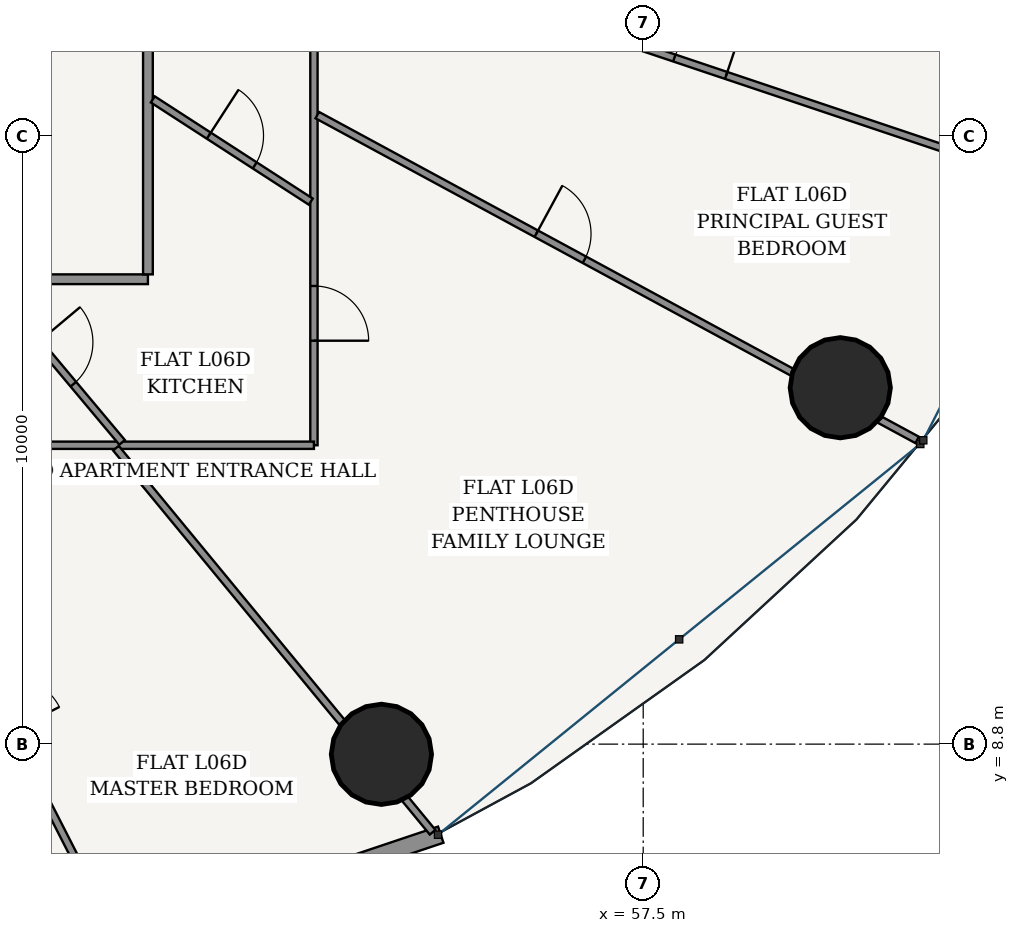
"""IFC4 building model, lengths in metres.
Left out: names, types, materials, properties, quantities, classifications, styles, units other than length and angle.
Written with IfcOpenShell. Run it as: python <this file> out.ifc"""

import sys

from ifc_helpers import new_model, si_unit, direction, frame, frame_2d, origin, origin_2d, place, context, subcontext, project, spatial, rectangle, hollow_circle, extrude, source, transform, mapped, element, fill, save


model = new_model("IFC4")
c1 = context("Model", 3, precision=1e-05, world=origin(), true_north=direction((-0.2419218956, 0.970295726276)))
c2 = subcontext(c1, "Body", "Model", "MODEL_VIEW")
j1 = project(units=[si_unit("LENGTHUNIT", "METRE"), si_unit("PLANEANGLEUNIT", "RADIAN")], contexts=[c1])
p1 = place(None, origin())
s1 = spatial("IfcSite", under=j1, at=p1, CompositionType="ELEMENT")
p2 = place(p1, origin())
s2 = spatial("IfcBuilding", under=s1, at=p2, CompositionType="ELEMENT")
p3 = place(p2, frame((0.0, 0.0, 27.6)))
s3 = spatial("IfcBuildingStorey", under=s2, at=p3, CompositionType="ELEMENT", Elevation=27.6)
for number, where, z_axis, x_axis in (
    (1, (53.195, 8.632, 0.0), (0.0, 0.0, 1.0), (1.0, 0.0, 0.0)),
    (2, (60.741, 14.661, 0.0), (0.0, 0.0, 1.0), (1.0, 0.0, 0.0)),
):
    element("IfcColumn", number, at=place(p3, frame(where, z_axis=z_axis, x_axis=x_axis)), inside=s3, PredefinedType="COLUMN", context=c2, shape_type="SweptSolid", body=[
        extrude(hollow_circle(Radius=0.825, WallThickness=0.05, at=origin_2d()), origin(), (0.0, 0.0, 1.0), 3.6),
    ])
p4 = place(p3, frame((43.576, 3.756, 0.0), z_axis=(0.0, 0.0, 1.0), x_axis=(0.948047847546, 0.31812777113, 0.0)))
e3 = element("IfcWall", 3, at=p4, inside=s3, PredefinedType="SOLIDWALL", context=c2, shape_type="SweptSolid", body=[
    extrude(rectangle(XDim=11.175, YDim=0.28, at=frame_2d((5.588, 0.0))), origin(), (0.0, 0.0, 1.0), 3.32),
])
p5 = place(p4, frame((1.967, 0.0, 0.85)))
e4 = element("IfcOpeningElement", 4, at=p5, cuts=e3, PredefinedType="OPENING", context=c2, shape_type="SweptSolid", body=[
    extrude(rectangle(XDim=2.1, YDim=1.95, at=frame_2d((1.05, 0.975))), frame((0.0, 0.15, 0.0), z_axis=(0.0, -1.0, 0.0), x_axis=(1.0, 0.0, 0.0)), (0.0, 0.0, 1.0), 0.3),
])
p6 = place(p4, frame((7.108, 0.0, 0.85)))
e5 = element("IfcOpeningElement", 5, at=p6, cuts=e3, PredefinedType="OPENING", context=c2, shape_type="SweptSolid", body=[
    extrude(rectangle(XDim=2.1, YDim=1.95, at=frame_2d((1.05, 0.975))), frame((0.0, 0.15, 0.0), z_axis=(0.0, -1.0, 0.0), x_axis=(1.0, 0.0, 0.0)), (0.0, 0.0, 1.0), 0.3),
])
p7 = place(p3, frame((26.645, 16.445, 0.0), z_axis=(0.0, 0.0, 1.0), x_axis=(1.0, 0.0, 0.0)))
e6 = element("IfcWall", 6, at=p7, inside=s3, PredefinedType="PARTITIONING", context=c2, shape_type="SweptSolid", body=[
    extrude(rectangle(XDim=22.71, YDim=0.16, at=frame_2d((11.355, 0.0))), origin(), (0.0, 0.0, 1.0), 2.688),
])
p8 = place(p7, frame((4.421, 0.0, 0.0)))
e7 = element("IfcOpeningElement", 7, at=p8, cuts=e6, PredefinedType="OPENING", context=c2, shape_type="SweptSolid", body=[
    extrude(rectangle(XDim=0.98, YDim=2.2, at=frame_2d((0.49, 1.1))), frame((0.0, 0.09, 0.0), z_axis=(0.0, -1.0, 0.0), x_axis=(1.0, 0.0, 0.0)), (0.0, 0.0, 1.0), 0.18),
])
p9 = place(p7, frame((16.153, 0.0, 0.0)))
e8 = element("IfcOpeningElement", 8, at=p9, cuts=e6, PredefinedType="OPENING", context=c2, shape_type="SweptSolid", body=[
    extrude(rectangle(XDim=0.98, YDim=2.2, at=frame_2d((0.49, 1.1))), frame((0.0, 0.09, 0.0), z_axis=(0.0, -1.0, 0.0), x_axis=(1.0, 0.0, 0.0)), (0.0, 0.0, 1.0), 0.18),
])
p10 = place(p3, frame((49.355, 16.525, 0.0), z_axis=(0.0, 0.0, 1.0), x_axis=(0.0, 1.0, 0.0)))
e9 = element("IfcWall", 9, at=p10, inside=s3, PredefinedType="PARTITIONING", context=c2, shape_type="SweptSolid", body=[
    extrude(rectangle(XDim=20.55, YDim=0.16, at=frame_2d((10.275, 0.0))), origin(), (0.0, 0.0, 1.0), 2.688),
])
p11 = place(p10, frame((15.635, 0.0, 0.0)))
e10 = element("IfcOpeningElement", 10, at=p11, cuts=e9, PredefinedType="OPENING", context=c2, shape_type="SweptSolid", body=[
    extrude(rectangle(XDim=0.98, YDim=2.2, at=frame_2d((0.49, 1.1))), frame((0.0, 0.09, 0.0), z_axis=(0.0, -1.0, 0.0), x_axis=(1.0, 0.0, 0.0)), (0.0, 0.0, 1.0), 0.18),
])
p12 = place(p3, frame((52.085, 24.428, 0.0), z_axis=(0.0, 0.0, 1.0), x_axis=(0.0, -1.0, 0.0)))
e11 = element("IfcWall", 11, at=p12, inside=s3, PredefinedType="PARTITIONING", context=c2, shape_type="SweptSolid", body=[
    extrude(rectangle(XDim=10.713, YDim=0.12, at=frame_2d((5.356, 0.0))), origin(), (0.0, 0.0, 1.0), 2.688),
])
p13 = place(p12, frame((8.094, 0.0, 0.0)))
e12 = element("IfcOpeningElement", 12, at=p13, cuts=e11, PredefinedType="OPENING", context=c2, shape_type="SweptSolid", body=[
    extrude(rectangle(XDim=0.9, YDim=2.15, at=frame_2d((0.45, 1.075))), frame((0.0, 0.07, 0.0), z_axis=(0.0, -1.0, 0.0), x_axis=(1.0, 0.0, 0.0)), (0.0, 0.0, 1.0), 0.14),
])
p14 = place(p3, frame((52.085, 13.715, 0.0), z_axis=(0.0, 0.0, 1.0), x_axis=(-1.0, 0.0, 0.0)))
e13 = element("IfcWall", 13, at=p14, inside=s3, PredefinedType="PARTITIONING", context=c2, shape_type="SweptSolid", body=[
    extrude(rectangle(XDim=17.195, YDim=0.12, at=frame_2d((8.597, 0.0))), origin(), (0.0, 0.0, 1.0), 2.688),
])
p15 = place(p14, frame((9.191, 0.0, 0.0)))
e14 = element("IfcOpeningElement", 14, at=p15, cuts=e13, PredefinedType="OPENING", context=c2, shape_type="SweptSolid", body=[
    extrude(rectangle(XDim=0.9, YDim=2.15, at=frame_2d((0.45, 1.075))), frame((0.0, 0.07, 0.0), z_axis=(0.0, -1.0, 0.0), x_axis=(1.0, 0.0, 0.0)), (0.0, 0.0, 1.0), 0.14),
])
p16 = place(p3, frame((44.717, 13.66, 0.0), z_axis=(0.0, 0.0, 1.0), x_axis=(0.455131303234, -0.890424335256, 0.0)))
e15 = element("IfcWall", 15, at=p16, inside=s3, PredefinedType="PARTITIONING", context=c2, shape_type="SweptSolid", body=[
    extrude(rectangle(XDim=9.562, YDim=0.12, at=frame_2d((4.781, 0.0))), origin(), (0.0, 0.0, 1.0), 2.762),
])
p17 = place(p16, frame((4.331, 0.0, 0.0)))
e16 = element("IfcOpeningElement", 16, at=p17, cuts=e15, PredefinedType="OPENING", context=c2, shape_type="SweptSolid", body=[
    extrude(rectangle(XDim=0.9, YDim=2.15, at=frame_2d((0.45, 1.075))), frame((0.0, 0.07, 0.0), z_axis=(0.0, -1.0, 0.0), x_axis=(1.0, 0.0, 0.0)), (0.0, 0.0, 1.0), 0.14),
])
p18 = place(p3, frame((48.829, 13.667, 0.0), z_axis=(0.0, 0.0, 1.0), x_axis=(0.636177533893, -0.771542704826, 0.0)))
e17 = element("IfcWall", 17, at=p18, inside=s3, PredefinedType="PARTITIONING", context=c2, shape_type="SweptSolid", body=[
    extrude(rectangle(XDim=8.187, YDim=0.12, at=frame_2d((4.093, 0.0))), origin(), (0.0, 0.0, 1.0), 2.688),
])
p19 = place(p3, frame((52.139, 19.144, 0.0), z_axis=(0.0, 0.0, 1.0), x_axis=(0.879372452045, -0.476134529922, 0.0)))
e18 = element("IfcWall", 18, at=p19, inside=s3, PredefinedType="PARTITIONING", context=c2, shape_type="SweptSolid", body=[
    extrude(rectangle(XDim=11.219, YDim=0.12, at=frame_2d((5.61, 0.0))), origin(), (0.0, 0.0, 1.0), 2.688),
])
p20 = place(p19, frame((4.097, 0.0, 0.0)))
e19 = element("IfcOpeningElement", 19, at=p20, cuts=e18, PredefinedType="OPENING", context=c2, shape_type="SweptSolid", body=[
    extrude(rectangle(XDim=0.9, YDim=2.15, at=frame_2d((0.45, 1.075))), frame((0.0, 0.07, 0.0), z_axis=(0.0, -1.0, 0.0), x_axis=(1.0, 0.0, 0.0)), (0.0, 0.0, 1.0), 0.14),
])
p21 = place(p3, frame((52.144, 22.052, 0.0), z_axis=(0.0, 0.0, 1.0), x_axis=(0.948023034133, -0.318201707653, 0.0)))
e20 = element("IfcWall", 20, at=p21, inside=s3, PredefinedType="PARTITIONING", context=c2, shape_type="SweptSolid", body=[
    extrude(rectangle(XDim=13.279, YDim=0.12, at=frame_2d((6.639, 0.0))), origin(), (0.0, 0.0, 1.0), 2.762),
])
p22 = place(p21, frame((6.189, 0.0, 0.0)))
e21 = element("IfcOpeningElement", 21, at=p22, cuts=e20, PredefinedType="OPENING", context=c2, shape_type="SweptSolid", body=[
    extrude(rectangle(XDim=0.9, YDim=2.15, at=frame_2d((0.45, 1.075))), frame((0.0, 0.07, 0.0), z_axis=(0.0, -1.0, 0.0), x_axis=(1.0, 0.0, 0.0)), (0.0, 0.0, 1.0), 0.14),
])
p23 = place(p3, frame((46.749, 16.365, 0.0), z_axis=(0.0, 0.0, 1.0), x_axis=(0.64245841772, -0.766320547487, 0.0)))
e22 = element("IfcWall", 22, at=p23, inside=s3, PredefinedType="PARTITIONING", context=c2, shape_type="SweptSolid", body=[
    extrude(rectangle(XDim=3.396, YDim=0.12, at=frame_2d((1.698, 0.0))), origin(), (0.0, 0.0, 1.0), 3.32),
])
p24 = place(p23, frame((1.248, 0.0, 0.0)))
e23 = element("IfcOpeningElement", 23, at=p24, cuts=e22, PredefinedType="OPENING", context=c2, shape_type="SweptSolid", body=[
    extrude(rectangle(XDim=0.9, YDim=2.15, at=frame_2d((0.45, 1.075))), frame((0.0, 0.07, 0.0), z_axis=(0.0, -1.0, 0.0), x_axis=(1.0, 0.0, 0.0)), (0.0, 0.0, 1.0), 0.14),
])
p25 = place(p3, frame((49.435, 19.402, 0.0), z_axis=(0.0, 0.0, 1.0), x_axis=(0.839582858019, -0.543231649042, 0.0)))
e24 = element("IfcWall", 24, at=p25, inside=s3, PredefinedType="PARTITIONING", context=c2, shape_type="SweptSolid", body=[
    extrude(rectangle(XDim=3.094, YDim=0.12, at=frame_2d((1.547, 0.0))), origin(), (0.0, 0.0, 1.0), 3.32),
])
p26 = place(p25, frame((1.097, 0.0, 0.0)))
e25 = element("IfcOpeningElement", 25, at=p26, cuts=e24, PredefinedType="OPENING", context=c2, shape_type="SweptSolid", body=[
    extrude(rectangle(XDim=0.9, YDim=2.15, at=frame_2d((0.45, 1.075))), frame((0.0, 0.07, 0.0), z_axis=(0.0, -1.0, 0.0), x_axis=(1.0, 0.0, 0.0)), (0.0, 0.0, 1.0), 0.14),
])
m1 = source(origin(), c2, "Body", "SweptSolid", [
    extrude(rectangle(XDim=0.9, YDim=2.15, at=frame_2d((0.45, 1.075))), frame((0.0, 0.025, 0.0), z_axis=(0.0, -1.0, 0.0), x_axis=(1.0, 0.0, 0.0)), (0.0, 0.0, 1.0), 0.05),
])
p27 = place(p24, origin())
e26 = element("IfcDoor", 26, at=p27, inside=s3, OperationType="SINGLE_SWING_LEFT", PredefinedType="DOOR", context=c2, shape_type="MappedRepresentation", body=[
    mapped(m1, transform((0.0, 0.0, 0.0), scale=1.0)),
])
fill(e23, e26)
p28 = place(p13, origin())
e27 = element("IfcDoor", 27, at=p28, inside=s3, OperationType="SINGLE_SWING_RIGHT", PredefinedType="DOOR", context=c2, shape_type="MappedRepresentation", body=[
    mapped(m1, transform((0.0, 0.0, 0.0), scale=1.0)),
])
fill(e12, e27)
p29 = place(p26, origin())
e28 = element("IfcDoor", 28, at=p29, inside=s3, OperationType="SINGLE_SWING_LEFT", PredefinedType="DOOR", context=c2, shape_type="MappedRepresentation", body=[
    mapped(m1, transform((0.0, 0.0, 0.0), scale=1.0)),
])
fill(e25, e28)
p30 = place(p20, origin())
e29 = element("IfcDoor", 29, at=p30, inside=s3, OperationType="SINGLE_SWING_LEFT", PredefinedType="DOOR", context=c2, shape_type="MappedRepresentation", body=[
    mapped(m1, transform((0.0, 0.0, 0.0), scale=1.0)),
])
fill(e19, e29)
p31 = place(p22, origin())
e30 = element("IfcDoor", 30, at=p31, inside=s3, OperationType="SINGLE_SWING_RIGHT", PredefinedType="DOOR", context=c2, shape_type="MappedRepresentation", body=[
    mapped(m1, transform((0.0, 0.0, 0.0), scale=1.0)),
])
fill(e21, e30)
save(model, sys.argv[1])
